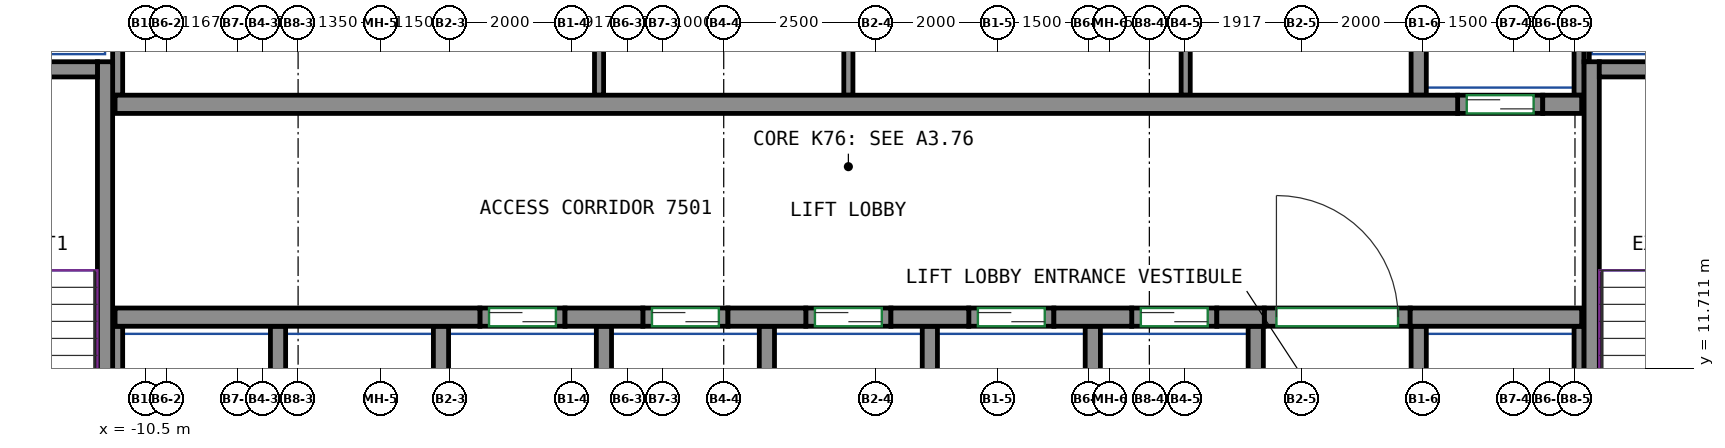
"""IFC4 building model, lengths in metres.
Left out: names, types, materials, properties, quantities, classifications, styles, units other than length and angle.
Written with IfcOpenShell. Run it as: python <this file> out.ifc"""

import sys

from ifc_helpers import new_model, si_unit, direction, frame, frame_2d, origin, place, context, subcontext, project, spatial, rectangle, extrude, source, transform, mapped, element, fill, save


model = new_model("IFC4")
c1 = context("Model", 3, precision=1e-05, world=origin(), true_north=direction((0.0, 1.0)))
c2 = subcontext(c1, "Body", "Model", "MODEL_VIEW")
j1 = project(units=[si_unit("LENGTHUNIT", "METRE"), si_unit("PLANEANGLEUNIT", "RADIAN")], contexts=[c1])
p1 = place(None, origin())
s1 = spatial("IfcSite", under=j1, at=p1, CompositionType="ELEMENT")
p2 = place(p1, origin())
s2 = spatial("IfcBuilding", under=s1, at=p2, CompositionType="ELEMENT")
p3 = place(p2, frame((0.0, 0.0, 301.8)))
s3 = spatial("IfcBuildingStorey", under=s2, at=p3, CompositionType="ELEMENT", Elevation=301.8)
m1 = source(origin(), c2, "Body", "SweptSolid", [
    extrude(rectangle(XDim=7.75, YDim=0.25, at=frame_2d((3.875, 0.0))), origin(), (0.0, 0.0, 1.0), 3.12),
])
p4 = place(p3, frame((-11.175, 9.0, 0.0), z_axis=(0.0, 0.0, 1.0), x_axis=(0.0, 1.0, 0.0)))
e1 = element("IfcWall", 1, at=p4, inside=s3, PredefinedType="SHEAR", context=c2, shape_type="MappedRepresentation", body=[
    mapped(m1, transform((0.0, 0.0, 0.0))),
])
m2 = source(origin(), c2, "Body", "SweptSolid", [
    extrude(rectangle(XDim=3.7, YDim=0.25, at=frame_2d((1.85, 0.0))), origin(), (0.0, 0.0, 1.0), 3.12),
])
p5 = place(p3, frame((-15.0, 16.625, 0.0), z_axis=(0.0, 0.0, 1.0), x_axis=(1.0, 0.0, 0.0)))
e2 = element("IfcWall", 2, at=p5, inside=s3, PredefinedType="SHEAR", context=c2, shape_type="MappedRepresentation", body=[
    mapped(m2, transform((0.0, 0.0, 0.0))),
])
p6 = place(p3, frame((13.275, 9.0, 0.0), z_axis=(0.0, 0.0, 1.0), x_axis=(0.0, 1.0, 0.0)))
e3 = element("IfcWall", 3, at=p6, inside=s3, PredefinedType="SHEAR", context=c2, shape_type="MappedRepresentation", body=[
    mapped(m1, transform((0.0, 0.0, 0.0))),
])
m3 = source(origin(), c2, "Body", "SweptSolid", [
    extrude(rectangle(XDim=3.7, YDim=0.25, at=frame_2d((1.85, 0.0))), origin(), (0.0, 0.0, 1.0), 3.12),
])
p7 = place(p3, frame((13.4, 16.625, 0.0), z_axis=(0.0, 0.0, 1.0), x_axis=(1.0, 0.0, 0.0)))
e4 = element("IfcWall", 4, at=p7, inside=s3, PredefinedType="SHEAR", context=c2, shape_type="MappedRepresentation", body=[
    mapped(m3, transform((0.0, 0.0, 0.0))),
])
m4 = source(origin(), c2, "Body", "SweptSolid", [
    extrude(rectangle(XDim=6.0, YDim=0.3, at=frame_2d((3.0, 0.0))), origin(), (0.0, 0.0, 1.0), 3.12),
])
p8 = place(p3, frame((-11.01, 12.55, 0.0), z_axis=(0.0, 0.0, 1.0), x_axis=(1.0, 0.0, 0.0)))
e5 = element("IfcWall", 5, at=p8, inside=s3, PredefinedType="SHEAR", context=c2, shape_type="MappedRepresentation", body=[
    mapped(m4, transform((0.0, 0.0, 0.0))),
])
m5 = source(origin(), c2, "Body", "SweptSolid", [
    extrude(rectangle(XDim=1.28, YDim=0.3, at=frame_2d((0.64, 0.0))), origin(), (0.0, 0.0, 1.0), 3.12),
])
for number, where, z_axis, x_axis in (
    (6, (-3.61, 12.55, 0.0), (0.0, 0.0, 1.0), (1.0, 0.0, 0.0)),
    (7, (-0.93, 12.55, 0.0), (0.0, 0.0, 1.0), (1.0, 0.0, 0.0)),
    (8, (1.75, 12.55, 0.0), (0.0, 0.0, 1.0), (1.0, 0.0, 0.0)),
    (9, (4.43, 12.55, 0.0), (0.0, 0.0, 1.0), (1.0, 0.0, 0.0)),
):
    element("IfcWall", number, at=place(p3, frame(where, z_axis=z_axis, x_axis=x_axis)), inside=s3, PredefinedType="SHEAR", context=c2, shape_type="MappedRepresentation", body=[
        mapped(m5, transform((0.0, 0.0, 0.0))),
    ])
m6 = source(origin(), c2, "Body", "SweptSolid", [
    extrude(rectangle(XDim=0.78, YDim=0.3, at=frame_2d((0.39, 0.0))), origin(), (0.0, 0.0, 1.0), 3.12),
])
p9 = place(p3, frame((7.11, 12.55, 0.0), z_axis=(0.0, 0.0, 1.0), x_axis=(1.0, 0.0, 0.0)))
e10 = element("IfcWall", 10, at=p9, inside=s3, PredefinedType="SHEAR", context=c2, shape_type="MappedRepresentation", body=[
    mapped(m6, transform((0.0, 0.0, 0.0))),
])
m7 = source(origin(), c2, "Body", "SweptSolid", [
    extrude(rectangle(XDim=2.82, YDim=0.3, at=frame_2d((1.41, 0.0))), origin(), (0.0, 0.0, 1.0), 3.12),
])
p10 = place(p3, frame((10.29, 12.55, 0.0), z_axis=(0.0, 0.0, 1.0), x_axis=(1.0, 0.0, 0.0)))
e11 = element("IfcWall", 11, at=p10, inside=s3, PredefinedType="SHEAR", context=c2, shape_type="MappedRepresentation", body=[
    mapped(m7, transform((0.0, 0.0, 0.0))),
])
m8 = source(origin(), c2, "Body", "SweptSolid", [
    extrude(rectangle(XDim=22.08, YDim=0.3, at=frame_2d((11.04, 0.0))), origin(), (0.0, 0.0, 1.0), 3.12),
])
p11 = place(p3, frame((-11.01, 16.05, 0.0), z_axis=(0.0, 0.0, 1.0), x_axis=(1.0, 0.0, 0.0)))
e12 = element("IfcWall", 12, at=p11, inside=s3, PredefinedType="SHEAR", context=c2, shape_type="MappedRepresentation", body=[
    mapped(m8, transform((0.0, 0.0, 0.0))),
])
m9 = source(origin(), c2, "Body", "SweptSolid", [
    extrude(rectangle(XDim=0.64, YDim=0.3, at=frame_2d((0.32, 0.0))), origin(), (0.0, 0.0, 1.0), 3.12),
])
p12 = place(p3, frame((12.47, 16.05, 0.0), z_axis=(0.0, 0.0, 1.0), x_axis=(1.0, 0.0, 0.0)))
e13 = element("IfcWall", 13, at=p12, inside=s3, PredefinedType="SHEAR", context=c2, shape_type="MappedRepresentation", body=[
    mapped(m9, transform((0.0, 0.0, 0.0))),
])
m10 = source(origin(), c2, "Body", "SweptSolid", [
    extrude(rectangle(XDim=1.4, YDim=0.3, at=frame_2d((0.7, 0.0))), origin(), (0.0, 0.0, 1.0), 3.12),
])
p13 = place(p3, frame((-5.01, 12.55, 0.0), z_axis=(0.0, 0.0, 1.0), x_axis=(1.0, 0.0, 0.0)))
e14 = element("IfcWall", 14, at=p13, inside=s3, PredefinedType="PARTITIONING", context=c2, shape_type="MappedRepresentation", body=[
    mapped(m10, transform((0.0, 0.0, 0.0))),
])
p14 = place(p13, frame((0.15, 0.0, 0.0)))
e15 = element("IfcOpeningElement", 15, at=p14, cuts=e14, PredefinedType="OPENING", context=c2, shape_type="SweptSolid", body=[
    extrude(rectangle(XDim=1.1, YDim=2.1, at=frame_2d((0.55, 1.05))), frame((0.0, 0.16, 0.0), z_axis=(0.0, -1.0, 0.0), x_axis=(1.0, 0.0, 0.0)), (0.0, 0.0, 1.0), 0.32),
])
m11 = source(origin(), c2, "Body", "SweptSolid", [
    extrude(rectangle(XDim=1.4, YDim=0.3, at=frame_2d((0.7, 0.0))), origin(), (0.0, 0.0, 1.0), 3.12),
])
p15 = place(p3, frame((-2.33, 12.55, 0.0), z_axis=(0.0, 0.0, 1.0), x_axis=(1.0, 0.0, 0.0)))
e16 = element("IfcWall", 16, at=p15, inside=s3, PredefinedType="PARTITIONING", context=c2, shape_type="MappedRepresentation", body=[
    mapped(m11, transform((0.0, 0.0, 0.0))),
])
p16 = place(p15, frame((0.15, 0.0, 0.0)))
e17 = element("IfcOpeningElement", 17, at=p16, cuts=e16, PredefinedType="OPENING", context=c2, shape_type="SweptSolid", body=[
    extrude(rectangle(XDim=1.1, YDim=2.1, at=frame_2d((0.55, 1.05))), frame((0.0, 0.16, 0.0), z_axis=(0.0, -1.0, 0.0), x_axis=(1.0, 0.0, 0.0)), (0.0, 0.0, 1.0), 0.32),
])
p17 = place(p3, frame((0.35, 12.55, 0.0), z_axis=(0.0, 0.0, 1.0), x_axis=(1.0, 0.0, 0.0)))
e18 = element("IfcWall", 18, at=p17, inside=s3, PredefinedType="PARTITIONING", context=c2, shape_type="MappedRepresentation", body=[
    mapped(m10, transform((0.0, 0.0, 0.0))),
])
p18 = place(p17, frame((0.15, 0.0, 0.0)))
e19 = element("IfcOpeningElement", 19, at=p18, cuts=e18, PredefinedType="OPENING", context=c2, shape_type="SweptSolid", body=[
    extrude(rectangle(XDim=1.1, YDim=2.1, at=frame_2d((0.55, 1.05))), frame((0.0, 0.16, 0.0), z_axis=(0.0, -1.0, 0.0), x_axis=(1.0, 0.0, 0.0)), (0.0, 0.0, 1.0), 0.32),
])
p19 = place(p3, frame((3.03, 12.55, 0.0), z_axis=(0.0, 0.0, 1.0), x_axis=(1.0, 0.0, 0.0)))
e20 = element("IfcWall", 20, at=p19, inside=s3, PredefinedType="PARTITIONING", context=c2, shape_type="MappedRepresentation", body=[
    mapped(m10, transform((0.0, 0.0, 0.0))),
])
p20 = place(p19, frame((0.15, 0.0, 0.0)))
e21 = element("IfcOpeningElement", 21, at=p20, cuts=e20, PredefinedType="OPENING", context=c2, shape_type="SweptSolid", body=[
    extrude(rectangle(XDim=1.1, YDim=2.1, at=frame_2d((0.55, 1.05))), frame((0.0, 0.16, 0.0), z_axis=(0.0, -1.0, 0.0), x_axis=(1.0, 0.0, 0.0)), (0.0, 0.0, 1.0), 0.32),
])
p21 = place(p3, frame((5.71, 12.55, 0.0), z_axis=(0.0, 0.0, 1.0), x_axis=(1.0, 0.0, 0.0)))
e22 = element("IfcWall", 22, at=p21, inside=s3, PredefinedType="PARTITIONING", context=c2, shape_type="MappedRepresentation", body=[
    mapped(m11, transform((0.0, 0.0, 0.0))),
])
p22 = place(p21, frame((0.15, 0.0, 0.0)))
e23 = element("IfcOpeningElement", 23, at=p22, cuts=e22, PredefinedType="OPENING", context=c2, shape_type="SweptSolid", body=[
    extrude(rectangle(XDim=1.1, YDim=2.1, at=frame_2d((0.55, 1.05))), frame((0.0, 0.16, 0.0), z_axis=(0.0, -1.0, 0.0), x_axis=(1.0, 0.0, 0.0)), (0.0, 0.0, 1.0), 0.32),
])
p23 = place(p3, frame((11.07, 16.05, 0.0), z_axis=(0.0, 0.0, 1.0), x_axis=(1.0, 0.0, 0.0)))
e24 = element("IfcWall", 24, at=p23, inside=s3, PredefinedType="PARTITIONING", context=c2, shape_type="MappedRepresentation", body=[
    mapped(m10, transform((0.0, 0.0, 0.0))),
])
p24 = place(p23, frame((0.15, 0.0, 0.0)))
e25 = element("IfcOpeningElement", 25, at=p24, cuts=e24, PredefinedType="OPENING", context=c2, shape_type="SweptSolid", body=[
    extrude(rectangle(XDim=1.1, YDim=2.1, at=frame_2d((0.55, 1.05))), frame((0.0, 0.16, 0.0), z_axis=(0.0, -1.0, 0.0), x_axis=(1.0, 0.0, 0.0)), (0.0, 0.0, 1.0), 0.32),
])
m12 = source(origin(), c2, "Body", "SweptSolid", [
    extrude(rectangle(XDim=2.4, YDim=0.3, at=frame_2d((1.2, 0.0))), origin(), (0.0, 0.0, 1.0), 3.12),
])
p25 = place(p3, frame((7.89, 12.55, 0.0), z_axis=(0.0, 0.0, 1.0), x_axis=(1.0, 0.0, 0.0)))
e26 = element("IfcWall", 26, at=p25, inside=s3, PredefinedType="PARTITIONING", context=c2, shape_type="MappedRepresentation", body=[
    mapped(m12, transform((0.0, 0.0, 0.0))),
])
p26 = place(p25, frame((0.2, 0.0, 0.0)))
e27 = element("IfcOpeningElement", 27, at=p26, cuts=e26, PredefinedType="OPENING", context=c2, shape_type="SweptSolid", body=[
    extrude(rectangle(XDim=2.0, YDim=2.1, at=frame_2d((1.0, 1.05))), frame((0.0, 0.16, 0.0), z_axis=(0.0, -1.0, 0.0), x_axis=(1.0, 0.0, 0.0)), (0.0, 0.0, 1.0), 0.32),
])
m13 = source(origin(), c2, "Body", "SweptSolid", [
    extrude(rectangle(XDim=3.275, YDim=0.165, at=frame_2d((1.638, 0.0))), origin(), (0.0, 0.0, 1.0), 3.12),
])
p27 = place(p3, frame((13.067, 16.2, 0.0), z_axis=(0.0, 0.0, 1.0), x_axis=(0.0, 1.0, 0.0)))
e28 = element("IfcWall", 28, at=p27, inside=s3, PredefinedType="PARTITIONING", context=c2, shape_type="MappedRepresentation", body=[
    mapped(m13, transform((0.0, 0.0, 0.0))),
])
m14 = source(origin(), c2, "Body", "SweptSolid", [
    extrude(rectangle(XDim=4.8, YDim=0.165, at=frame_2d((2.4, 0.0))), origin(), (0.0, 0.0, 1.0), 3.12),
])
p28 = place(p3, frame((-10.968, 16.2, 0.0), z_axis=(0.0, 0.0, 1.0), x_axis=(0.0, 1.0, 0.0)))
e29 = element("IfcWall", 29, at=p28, inside=s3, PredefinedType="PARTITIONING", context=c2, shape_type="MappedRepresentation", body=[
    mapped(m14, transform((0.0, 0.0, 0.0))),
])
m15 = source(origin(), c2, "Body", "SweptSolid", [
    extrude(rectangle(XDim=3.275, YDim=0.25, at=frame_2d((1.638, 0.0))), origin(), (0.0, 0.0, 1.0), 3.12),
])
p29 = place(p3, frame((10.43, 16.2, 0.0), z_axis=(0.0, 0.0, 1.0), x_axis=(0.0, 1.0, 0.0)))
e30 = element("IfcWall", 30, at=p29, inside=s3, PredefinedType="PARTITIONING", context=c2, shape_type="MappedRepresentation", body=[
    mapped(m15, transform((0.0, 0.0, 0.0))),
])
m16 = source(origin(), c2, "Body", "SweptSolid", [
    extrude(rectangle(XDim=2.725, YDim=0.085, at=frame_2d((1.363, 0.0))), origin(), (0.0, 0.0, 1.0), 3.12),
])
p30 = place(p3, frame((13.192, 16.75, 0.0), z_axis=(0.0, 0.0, 1.0), x_axis=(0.0, 1.0, 0.0)))
e31 = element("IfcWall", 31, at=p30, inside=s3, PredefinedType="PARTITIONING", context=c2, shape_type="MappedRepresentation", body=[
    mapped(m16, transform((0.0, 0.0, 0.0))),
])
m17 = source(origin(), c2, "Body", "SweptSolid", [
    extrude(rectangle(XDim=3.4, YDim=0.25, at=frame_2d((1.7, 0.0))), origin(), (0.0, 0.0, 1.0), 3.12),
])
p31 = place(p3, frame((10.43, 9.0, 0.0), z_axis=(0.0, 0.0, 1.0), x_axis=(0.0, 1.0, 0.0)))
e32 = element("IfcWall", 32, at=p31, inside=s3, PredefinedType="PARTITIONING", context=c2, shape_type="MappedRepresentation", body=[
    mapped(m17, transform((0.0, 0.0, 0.0))),
])
m18 = source(origin(), c2, "Body", "SweptSolid", [
    extrude(rectangle(XDim=3.4, YDim=0.165, at=frame_2d((1.7, 0.0))), origin(), (0.0, 0.0, 1.0), 3.12),
])
p32 = place(p3, frame((13.067, 9.0, 0.0), z_axis=(0.0, 0.0, 1.0), x_axis=(0.0, 1.0, 0.0)))
e33 = element("IfcWall", 33, at=p32, inside=s3, PredefinedType="PARTITIONING", context=c2, shape_type="MappedRepresentation", body=[
    mapped(m18, transform((0.0, 0.0, 0.0))),
])
for number, where, z_axis, x_axis in (
    (34, (2.39, 9.0, 0.0), (0.0, 0.0, 1.0), (0.0, 1.0, 0.0)),
    (35, (5.07, 9.0, 0.0), (0.0, 0.0, 1.0), (0.0, 1.0, 0.0)),
    (36, (7.75, 9.0, 0.0), (0.0, 0.0, 1.0), (0.0, 1.0, 0.0)),
    (37, (-0.29, 9.0, 0.0), (0.0, 0.0, 1.0), (0.0, 1.0, 0.0)),
):
    element("IfcWall", number, at=place(p3, frame(where, z_axis=z_axis, x_axis=x_axis)), inside=s3, PredefinedType="PARTITIONING", context=c2, shape_type="MappedRepresentation", body=[
        mapped(m17, transform((0.0, 0.0, 0.0))),
    ])
p33 = place(p3, frame((-10.968, 9.0, 0.0), z_axis=(0.0, 0.0, 1.0), x_axis=(0.0, 1.0, 0.0)))
e38 = element("IfcWall", 38, at=p33, inside=s3, PredefinedType="PARTITIONING", context=c2, shape_type="MappedRepresentation", body=[
    mapped(m18, transform((0.0, 0.0, 0.0))),
])
for number, where, z_axis, x_axis in (
    (39, (-2.97, 9.0, 0.0), (0.0, 0.0, 1.0), (0.0, 1.0, 0.0)),
    (40, (-5.65, 9.0, 0.0), (0.0, 0.0, 1.0), (0.0, 1.0, 0.0)),
    (41, (-8.33, 9.0, 0.0), (0.0, 0.0, 1.0), (0.0, 1.0, 0.0)),
):
    element("IfcWall", number, at=place(p3, frame(where, z_axis=z_axis, x_axis=x_axis)), inside=s3, PredefinedType="PARTITIONING", context=c2, shape_type="MappedRepresentation", body=[
        mapped(m17, transform((0.0, 0.0, 0.0))),
    ])
m19 = source(origin(), c2, "Body", "SweptSolid", [
    extrude(rectangle(XDim=4.8, YDim=0.15, at=frame_2d((2.4, 0.0))), origin(), (0.0, 0.0, 1.0), 3.12),
])
for number, where, z_axis, x_axis in (
    (42, (-3.05, 16.2, 0.0), (0.0, 0.0, 1.0), (0.0, 1.0, 0.0)),
    (43, (1.05, 16.2, 0.0), (0.0, 0.0, 1.0), (0.0, 1.0, 0.0)),
    (44, (6.598, 16.2, 0.0), (0.0, 0.0, 1.0), (0.0, 1.0, 0.0)),
):
    element("IfcWall", number, at=place(p3, frame(where, z_axis=z_axis, x_axis=x_axis)), inside=s3, PredefinedType="PARTITIONING", context=c2, shape_type="MappedRepresentation", body=[
        mapped(m19, transform((0.0, 0.0, 0.0))),
    ])
p34 = place(p26, origin())
e45 = element("IfcDoor", 45, at=p34, inside=s3, OperationType="DOUBLE_DOOR_SINGLE_SWING", PredefinedType="DOOR", context=c2, shape_type="SweptSolid", body=[
    extrude(rectangle(XDim=2.0, YDim=2.1, at=frame_2d((1.0, 1.05))), frame((0.0, 0.025, 0.0), z_axis=(0.0, -1.0, 0.0), x_axis=(1.0, 0.0, 0.0)), (0.0, 0.0, 1.0), 0.05),
])
fill(e27, e45)
p35 = place(p14, origin())
e46 = element("IfcDoor", 46, at=p35, inside=s3, OperationType="DOUBLE_DOOR_SLIDING", PredefinedType="DOOR", context=c2, shape_type="SweptSolid", body=[
    extrude(rectangle(XDim=1.1, YDim=2.1, at=frame_2d((0.55, 1.05))), frame((0.0, 0.025, 0.0), z_axis=(0.0, -1.0, 0.0), x_axis=(1.0, 0.0, 0.0)), (0.0, 0.0, 1.0), 0.05),
])
fill(e15, e46)
p36 = place(p16, origin())
e47 = element("IfcDoor", 47, at=p36, inside=s3, OperationType="DOUBLE_DOOR_SLIDING", PredefinedType="DOOR", context=c2, shape_type="SweptSolid", body=[
    extrude(rectangle(XDim=1.1, YDim=2.1, at=frame_2d((0.55, 1.05))), frame((0.0, 0.025, 0.0), z_axis=(0.0, -1.0, 0.0), x_axis=(1.0, 0.0, 0.0)), (0.0, 0.0, 1.0), 0.05),
])
fill(e17, e47)
p37 = place(p18, origin())
e48 = element("IfcDoor", 48, at=p37, inside=s3, OperationType="DOUBLE_DOOR_SLIDING", PredefinedType="DOOR", context=c2, shape_type="SweptSolid", body=[
    extrude(rectangle(XDim=1.1, YDim=2.1, at=frame_2d((0.55, 1.05))), frame((0.0, 0.025, 0.0), z_axis=(0.0, -1.0, 0.0), x_axis=(1.0, 0.0, 0.0)), (0.0, 0.0, 1.0), 0.05),
])
fill(e19, e48)
p38 = place(p20, origin())
e49 = element("IfcDoor", 49, at=p38, inside=s3, OperationType="DOUBLE_DOOR_SLIDING", PredefinedType="DOOR", context=c2, shape_type="SweptSolid", body=[
    extrude(rectangle(XDim=1.1, YDim=2.1, at=frame_2d((0.55, 1.05))), frame((0.0, 0.025, 0.0), z_axis=(0.0, -1.0, 0.0), x_axis=(1.0, 0.0, 0.0)), (0.0, 0.0, 1.0), 0.05),
])
fill(e21, e49)
p39 = place(p22, origin())
e50 = element("IfcDoor", 50, at=p39, inside=s3, OperationType="DOUBLE_DOOR_SLIDING", PredefinedType="DOOR", context=c2, shape_type="SweptSolid", body=[
    extrude(rectangle(XDim=1.1, YDim=2.1, at=frame_2d((0.55, 1.05))), frame((0.0, 0.025, 0.0), z_axis=(0.0, -1.0, 0.0), x_axis=(1.0, 0.0, 0.0)), (0.0, 0.0, 1.0), 0.05),
])
fill(e23, e50)
p40 = place(p24, origin())
e51 = element("IfcDoor", 51, at=p40, inside=s3, OperationType="DOUBLE_DOOR_SLIDING", PredefinedType="DOOR", context=c2, shape_type="SweptSolid", body=[
    extrude(rectangle(XDim=1.1, YDim=2.1, at=frame_2d((0.55, 1.05))), frame((0.0, 0.025, 0.0), z_axis=(0.0, -1.0, 0.0), x_axis=(1.0, 0.0, 0.0)), (0.0, 0.0, 1.0), 0.05),
])
fill(e25, e51)
save(model, sys.argv[1])
